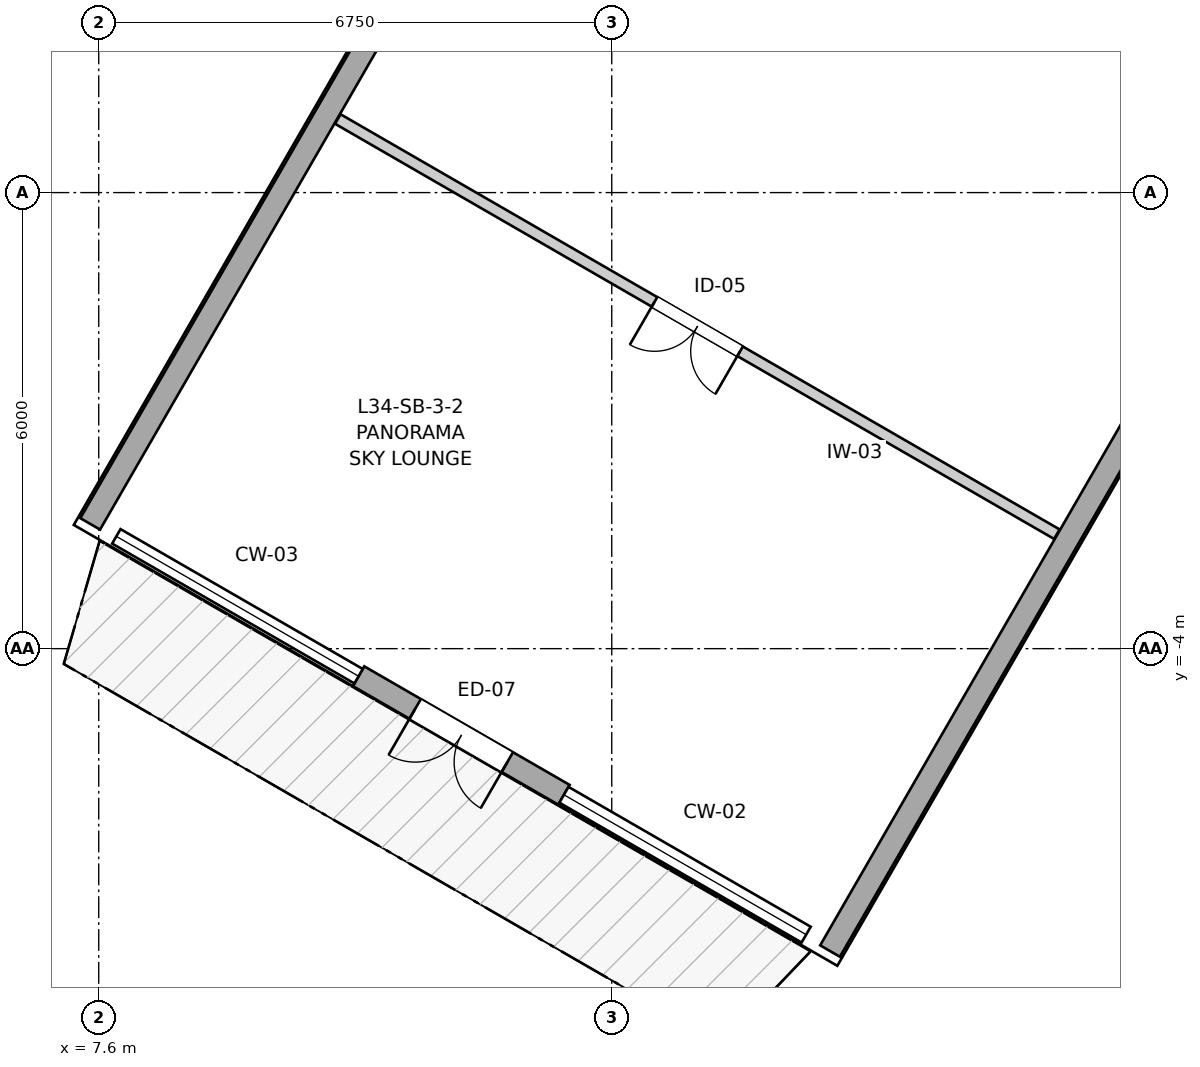
"""IFC4 building model, lengths in metres.
Left out: names, types, materials, properties, quantities, classifications, styles, units other than length and angle.
Written with IfcOpenShell. Run it as: python <this file> out.ifc"""

import sys

from ifc_helpers import new_model, si_unit, direction, frame, frame_2d, origin, place, context, subcontext, project, spatial, rectangle, extrude, source, transform, mapped, element, fill, save


model = new_model("IFC4")
c1 = context("Model", 3, precision=1e-05, world=origin(), true_north=direction((0.0, 1.0)))
c2 = subcontext(c1, "Body", "Model", "MODEL_VIEW")
j1 = project(units=[si_unit("LENGTHUNIT", "METRE"), si_unit("PLANEANGLEUNIT", "RADIAN")], contexts=[c1])
p1 = place(None, origin())
s1 = spatial("IfcSite", under=j1, at=p1, CompositionType="ELEMENT")
p2 = place(p1, origin())
s2 = spatial("IfcBuilding", under=s1, at=p2, CompositionType="ELEMENT")
p3 = place(p2, frame((0.0, 0.0, 115.2)))
s3 = spatial("IfcBuildingStorey", under=s2, at=p3, CompositionType="ELEMENT", Elevation=115.2)
p4 = place(p3, frame((27.267, 9.42, 0.0), z_axis=(0.0, 0.0, 1.0), x_axis=(-0.500001212782, -0.866024703583, 0.0)))
e1 = element("IfcWall", 1, at=p4, inside=s3, PredefinedType="SOLIDWALL", context=c2, shape_type="SweptSolid", body=[
    extrude(rectangle(XDim=20.09, YDim=0.3, at=frame_2d((10.045, 0.0))), origin(), (0.0, 0.0, 1.0), 2.13),
])
p5 = place(p3, frame((17.533, 15.04, 0.0), z_axis=(0.0, 0.0, 1.0), x_axis=(-0.499995950774, -0.866027741594, 0.0)))
e2 = element("IfcWall", 2, at=p5, inside=s3, PredefinedType="SOLIDWALL", context=c2, shape_type="SweptSolid", body=[
    extrude(rectangle(XDim=20.091, YDim=0.3, at=frame_2d((10.045, 0.0))), origin(), (0.0, 0.0, 1.0), 2.13),
])
p6 = place(p3, frame((13.721, -5.923, 0.0), z_axis=(0.0, 0.0, 1.0), x_axis=(-0.866009661879, 0.500027264788, 0.0)))
e3 = element("IfcWall", 3, at=p6, inside=s3, PredefinedType="SOLIDWALL", context=c2, shape_type="SweptSolid", body=[
    extrude(rectangle(XDim=3.12, YDim=0.3, at=frame_2d((1.56, 0.0))), origin(), (0.0, 0.0, 1.0), 2.3),
])
p7 = place(p6, frame((0.86, 0.0, 0.0)))
e4 = element("IfcOpeningElement", 4, at=p7, cuts=e3, PredefinedType="OPENING", context=c2, shape_type="SweptSolid", body=[
    extrude(rectangle(XDim=1.4, YDim=2.15, at=frame_2d((0.7, 1.075))), frame((0.0, 0.16, 0.0), z_axis=(0.0, -1.0, 0.0), x_axis=(1.0, 0.0, 0.0)), (0.0, 0.0, 1.0), 0.32),
])
p8 = place(p3, frame((20.206, -2.494, 0.0), z_axis=(0.0, 0.0, 1.0), x_axis=(-0.866034115916, 0.499984909842, 0.0)))
e5 = element("IfcWall", 5, at=p8, inside=s3, PredefinedType="PARTITIONING", context=c2, shape_type="SweptSolid", body=[
    extrude(rectangle(XDim=10.924, YDim=0.145, at=frame_2d((5.462, 0.0))), origin(), (0.0, 0.0, 1.0), 2.383),
])
p9 = place(p8, frame((4.812, 0.0, 0.0)))
e6 = element("IfcOpeningElement", 6, at=p9, cuts=e5, PredefinedType="OPENING", context=c2, shape_type="SweptSolid", body=[
    extrude(rectangle(XDim=1.3, YDim=2.1, at=frame_2d((0.65, 1.05))), frame((0.0, 0.083, 0.0), z_axis=(0.0, -1.0, 0.0), x_axis=(1.0, 0.0, 0.0)), (0.0, 0.0, 1.0), 0.165),
])
m1 = source(origin(), c2, "Body", "SweptSolid", [
    extrude(rectangle(XDim=1.4, YDim=2.15, at=frame_2d((0.7, 1.075))), frame((0.0, 0.025, 0.0), z_axis=(0.0, -1.0, 0.0), x_axis=(1.0, 0.0, 0.0)), (0.0, 0.0, 1.0), 0.05),
])
p10 = place(p7, origin())
e7 = element("IfcDoor", 7, at=p10, inside=s3, OperationType="DOUBLE_DOOR_SINGLE_SWING", PredefinedType="DOOR", context=c2, shape_type="MappedRepresentation", body=[
    mapped(m1, transform((0.0, 0.0, 0.0), x_axis=(1.0, 0.0, 0.0), y_axis=(0.0, 1.0, 0.0), z_axis=(0.0, 0.0, 1.0), scale=1.0)),
])
fill(e4, e7)
m2 = source(origin(), c2, "Body", "SweptSolid", [
    extrude(rectangle(XDim=1.3, YDim=2.1, at=frame_2d((0.65, 1.05))), frame((0.0, 0.025, 0.0), z_axis=(0.0, -1.0, 0.0), x_axis=(1.0, 0.0, 0.0)), (0.0, 0.0, 1.0), 0.05),
])
p11 = place(p9, origin())
e8 = element("IfcDoor", 8, at=p11, inside=s3, OperationType="DOUBLE_DOOR_SINGLE_SWING", PredefinedType="DOOR", context=c2, shape_type="MappedRepresentation", body=[
    mapped(m2, transform((0.0, 0.0, 0.0), x_axis=(1.0, 0.0, 0.0), y_axis=(0.0, 1.0, 0.0), z_axis=(0.0, 0.0, 1.0), scale=1.0)),
])
fill(e6, e8)
save(model, sys.argv[1])
